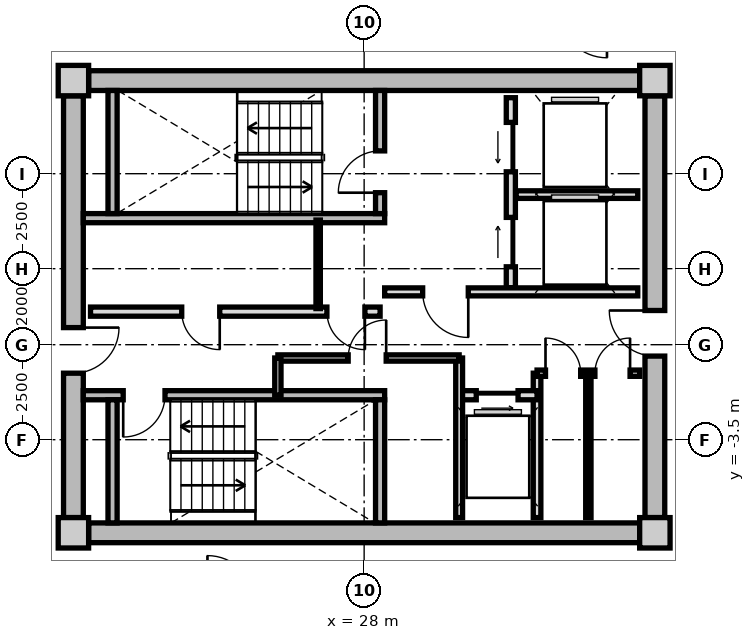
"""IFC4 building model, lengths in metres.
Left out: names, types, materials, properties, quantities, classifications, styles, units other than length and angle.
Written with IfcOpenShell. Run it as: python <this file> out.ifc"""

import sys

from ifc_helpers import new_model, si_unit, direction, frame, frame_2d, origin, origin_2d, place, context, subcontext, project, spatial, rectangle, extrude, source, transform, mapped, element, fill, save


model = new_model("IFC4")
c1 = context("Model", 3, precision=1e-05, world=origin(), true_north=direction((0.0, 1.0)))
c2 = subcontext(c1, "Body", "Model", "MODEL_VIEW")
j1 = project(units=[si_unit("LENGTHUNIT", "METRE"), si_unit("PLANEANGLEUNIT", "RADIAN")], contexts=[c1])
p1 = place(None, origin())
s1 = spatial("IfcSite", under=j1, at=p1, CompositionType="ELEMENT")
p2 = place(p1, origin())
s2 = spatial("IfcBuilding", under=s1, at=p2, CompositionType="ELEMENT")
p3 = place(p2, frame((0.0, 0.0, 241.35)))
s3 = spatial("IfcBuildingStorey", under=s2, at=p3, CompositionType="ELEMENT", Elevation=241.35)
m1 = source(origin(), c2, "Body", "SweptSolid", [
    extrude(rectangle(XDim=0.8, YDim=0.8, at=origin_2d()), origin(), (0.0, 0.0, 1.0), 3.05),
])
for number, where, z_axis, x_axis in (
    (1, (20.35, -5.95, 0.0), (0.0, 0.0, 1.0), (1.0, 0.0, 0.0)),
    (2, (35.65, -5.95, 0.0), (0.0, 0.0, 1.0), (1.0, 0.0, 0.0)),
    (3, (35.65, 5.95, 0.0), (0.0, 0.0, 1.0), (1.0, 0.0, 0.0)),
    (4, (20.35, 5.95, 0.0), (0.0, 0.0, 1.0), (1.0, 0.0, 0.0)),
):
    element("IfcColumn", number, at=place(p3, frame(where, z_axis=z_axis, x_axis=x_axis)), inside=s3, PredefinedType="COLUMN", context=c2, shape_type="MappedRepresentation", body=[
        mapped(m1, transform((0.0, 0.0, 0.0), x_axis=(1.0, 0.0, 0.0), y_axis=(0.0, 1.0, 0.0), z_axis=(0.0, 0.0, 1.0), scale=1.0)),
    ])
m2 = source(origin(), c2, "Body", "SweptSolid", [
    extrude(rectangle(XDim=14.5, YDim=0.52, at=frame_2d((7.25, 0.0))), origin(), (0.0, 0.0, 1.0), 2.73),
])
for number, where, z_axis, x_axis in (
    (5, (20.75, 5.95, 0.0), (0.0, 0.0, 1.0), (1.0, 0.0, 0.0)),
    (6, (35.25, -5.95, 0.0), (0.0, 0.0, 1.0), (-1.0, 0.0, 0.0)),
):
    element("IfcWall", number, at=place(p3, frame(where, z_axis=z_axis, x_axis=x_axis)), inside=s3, PredefinedType="SHEAR", context=c2, shape_type="MappedRepresentation", body=[
        mapped(m2, transform((0.0, 0.0, 0.0), x_axis=(1.0, 0.0, 0.0), y_axis=(0.0, 1.0, 0.0), z_axis=(0.0, 0.0, 1.0), scale=1.0)),
    ])
m3 = source(origin(), c2, "Body", "SweptSolid", [
    extrude(rectangle(XDim=11.1, YDim=0.52, at=frame_2d((5.55, 0.0))), origin(), (0.0, 0.0, 1.0), 2.73),
])
p4 = place(p3, frame((20.35, -5.55, 0.0), z_axis=(0.0, 0.0, 1.0), x_axis=(0.0, 1.0, 0.0)))
e7 = element("IfcWall", 7, at=p4, inside=s3, PredefinedType="SHEAR", context=c2, shape_type="MappedRepresentation", body=[
    mapped(m3, transform((0.0, 0.0, 0.0), x_axis=(1.0, 0.0, 0.0), y_axis=(0.0, 1.0, 0.0), z_axis=(0.0, 0.0, 1.0), scale=1.0)),
])
p5 = place(p4, frame((3.8, 0.0, 0.0)))
e8 = element("IfcOpeningElement", 8, at=p5, cuts=e7, PredefinedType="OPENING", context=c2, shape_type="SweptSolid", body=[
    extrude(rectangle(XDim=1.2, YDim=2.15, at=frame_2d((0.6, 1.075))), frame((0.0, 0.27, 0.0), z_axis=(0.0, -1.0, 0.0), x_axis=(1.0, 0.0, 0.0)), (0.0, 0.0, 1.0), 0.54),
])
p6 = place(p3, frame((35.65, 5.55, 0.0), z_axis=(0.0, 0.0, 1.0), x_axis=(0.0, -1.0, 0.0)))
e9 = element("IfcWall", 9, at=p6, inside=s3, PredefinedType="SHEAR", context=c2, shape_type="MappedRepresentation", body=[
    mapped(m3, transform((0.0, 0.0, 0.0), x_axis=(1.0, 0.0, 0.0), y_axis=(0.0, 1.0, 0.0), z_axis=(0.0, 0.0, 1.0), scale=1.0)),
])
p7 = place(p6, frame((5.65, 0.0, 0.0)))
e10 = element("IfcOpeningElement", 10, at=p7, cuts=e9, PredefinedType="OPENING", context=c2, shape_type="SweptSolid", body=[
    extrude(rectangle(XDim=1.2, YDim=2.15, at=frame_2d((0.6, 1.075))), frame((0.0, 0.27, 0.0), z_axis=(0.0, -1.0, 0.0), x_axis=(1.0, 0.0, 0.0)), (0.0, 0.0, 1.0), 0.54),
])
m4 = source(origin(), c2, "Body", "SweptSolid", [
    extrude(rectangle(XDim=7.93, YDim=0.24, at=frame_2d((3.965, 0.0))), origin(), (0.0, 0.0, 1.0), 2.73),
])
p8 = place(p3, frame((20.61, 2.33, 0.0), z_axis=(0.0, 0.0, 1.0), x_axis=(1.0, 0.0, 0.0)))
e11 = element("IfcWall", 11, at=p8, inside=s3, PredefinedType="PARTITIONING", context=c2, shape_type="MappedRepresentation", body=[
    mapped(m4, transform((0.0, 0.0, 0.0), x_axis=(1.0, 0.0, 0.0), y_axis=(0.0, 1.0, 0.0), z_axis=(0.0, 0.0, 1.0), scale=1.0)),
])
m5 = source(origin(), c2, "Body", "SweptSolid", [
    extrude(rectangle(XDim=3.24, YDim=0.24, at=frame_2d((1.62, 0.0))), origin(), (0.0, 0.0, 1.0), 2.73),
])
p9 = place(p3, frame((21.38, 2.45, 0.0), z_axis=(0.0, 0.0, 1.0), x_axis=(0.0, 1.0, 0.0)))
e12 = element("IfcWall", 12, at=p9, inside=s3, PredefinedType="PARTITIONING", context=c2, shape_type="MappedRepresentation", body=[
    mapped(m5, transform((0.0, 0.0, 0.0), x_axis=(1.0, 0.0, 0.0), y_axis=(0.0, 1.0, 0.0), z_axis=(0.0, 0.0, 1.0), scale=1.0)),
])
p10 = place(p3, frame((28.42, 2.45, 0.0), z_axis=(0.0, 0.0, 1.0), x_axis=(0.0, 1.0, 0.0)))
e13 = element("IfcWall", 13, at=p10, inside=s3, PredefinedType="PARTITIONING", context=c2, shape_type="MappedRepresentation", body=[
    mapped(m5, transform((0.0, 0.0, 0.0), x_axis=(1.0, 0.0, 0.0), y_axis=(0.0, 1.0, 0.0), z_axis=(0.0, 0.0, 1.0), scale=1.0)),
])
p11 = place(p10, frame((0.55, 0.0, 0.0)))
e14 = element("IfcOpeningElement", 14, at=p11, cuts=e13, PredefinedType="OPENING", context=c2, shape_type="SweptSolid", body=[
    extrude(rectangle(XDim=1.1, YDim=2.15, at=frame_2d((0.55, 1.075))), frame((0.0, 0.13, 0.0), z_axis=(0.0, -1.0, 0.0), x_axis=(1.0, 0.0, 0.0)), (0.0, 0.0, 1.0), 0.26),
])
p12 = place(p3, frame((20.61, -2.33, 0.0), z_axis=(0.0, 0.0, 1.0), x_axis=(1.0, 0.0, 0.0)))
e15 = element("IfcWall", 15, at=p12, inside=s3, PredefinedType="PARTITIONING", context=c2, shape_type="MappedRepresentation", body=[
    mapped(m4, transform((0.0, 0.0, 0.0), x_axis=(1.0, 0.0, 0.0), y_axis=(0.0, 1.0, 0.0), z_axis=(0.0, 0.0, 1.0), scale=1.0)),
])
p13 = place(p12, frame((1.05, 0.0, 0.0)))
e16 = element("IfcOpeningElement", 16, at=p13, cuts=e15, PredefinedType="OPENING", context=c2, shape_type="SweptSolid", body=[
    extrude(rectangle(XDim=1.1, YDim=2.15, at=frame_2d((0.55, 1.075))), frame((0.0, 0.13, 0.0), z_axis=(0.0, -1.0, 0.0), x_axis=(1.0, 0.0, 0.0)), (0.0, 0.0, 1.0), 0.26),
])
for number, where, z_axis, x_axis in (
    (17, (21.38, -5.69, 0.0), (0.0, 0.0, 1.0), (0.0, 1.0, 0.0)),
    (18, (28.42, -5.69, 0.0), (0.0, 0.0, 1.0), (0.0, 1.0, 0.0)),
):
    element("IfcWall", number, at=place(p3, frame(where, z_axis=z_axis, x_axis=x_axis)), inside=s3, PredefinedType="PARTITIONING", context=c2, shape_type="MappedRepresentation", body=[
        mapped(m5, transform((0.0, 0.0, 0.0), x_axis=(1.0, 0.0, 0.0), y_axis=(0.0, 1.0, 0.0), z_axis=(0.0, 0.0, 1.0), scale=1.0)),
    ])
m6 = source(origin(), c2, "Body", "SweptSolid", [
    extrude(rectangle(XDim=5.0, YDim=0.24, at=frame_2d((2.5, 0.0))), origin(), (0.0, 0.0, 1.0), 2.715),
])
p14 = place(p3, frame((31.86, 0.5, 0.0), z_axis=(0.0, 0.0, 1.0), x_axis=(0.0, 1.0, 0.0)))
e19 = element("IfcWall", 19, at=p14, inside=s3, PredefinedType="PARTITIONING", context=c2, shape_type="MappedRepresentation", body=[
    mapped(m6, transform((0.0, 0.0, 0.0), x_axis=(1.0, 0.0, 0.0), y_axis=(0.0, 1.0, 0.0), z_axis=(0.0, 0.0, 1.0), scale=1.0)),
])
p15 = place(p14, frame((3.05, 0.0, 0.0)))
e20 = element("IfcOpeningElement", 20, at=p15, cuts=e19, PredefinedType="OPENING", context=c2, shape_type="SweptSolid", body=[
    extrude(rectangle(XDim=1.3, YDim=2.2, at=frame_2d((0.65, 1.1))), frame((0.0, 0.13, 0.0), z_axis=(0.0, -1.0, 0.0), x_axis=(1.0, 0.0, 0.0)), (0.0, 0.0, 1.0), 0.26),
])
p16 = place(p14, frame((0.55, 0.0, 0.0)))
e21 = element("IfcOpeningElement", 21, at=p16, cuts=e19, PredefinedType="OPENING", context=c2, shape_type="SweptSolid", body=[
    extrude(rectangle(XDim=1.3, YDim=2.2, at=frame_2d((0.65, 1.1))), frame((0.0, 0.13, 0.0), z_axis=(0.0, -1.0, 0.0), x_axis=(1.0, 0.0, 0.0)), (0.0, 0.0, 1.0), 0.26),
])
m7 = source(origin(), c2, "Body", "SweptSolid", [
    extrude(rectangle(XDim=3.2, YDim=0.2, at=frame_2d((1.6, 0.0))), origin(), (0.0, 0.0, 1.0), 2.715),
])
p17 = place(p3, frame((32.0, 2.95, 0.0), z_axis=(0.0, 0.0, 1.0), x_axis=(1.0, 0.0, 0.0)))
e22 = element("IfcWall", 22, at=p17, inside=s3, PredefinedType="PARTITIONING", context=c2, shape_type="MappedRepresentation", body=[
    mapped(m7, transform((0.0, 0.0, 0.0), x_axis=(1.0, 0.0, 0.0), y_axis=(0.0, 1.0, 0.0), z_axis=(0.0, 0.0, 1.0), scale=1.0)),
])
m8 = source(origin(), c2, "Body", "SweptSolid", [
    extrude(rectangle(XDim=6.66, YDim=0.21, at=frame_2d((3.33, 0.0))), origin(), (0.0, 0.0, 1.0), 2.715),
])
p18 = place(p3, frame((28.54, 0.39, 0.0), z_axis=(0.0, 0.0, 1.0), x_axis=(1.0, 0.0, 0.0)))
e23 = element("IfcWall", 23, at=p18, inside=s3, PredefinedType="PARTITIONING", context=c2, shape_type="MappedRepresentation", body=[
    mapped(m8, transform((0.0, 0.0, 0.0), x_axis=(1.0, 0.0, 0.0), y_axis=(0.0, 1.0, 0.0), z_axis=(0.0, 0.0, 1.0), scale=1.0)),
])
p19 = place(p18, frame((1.0, 0.0, 0.0)))
e24 = element("IfcOpeningElement", 24, at=p19, cuts=e23, PredefinedType="OPENING", context=c2, shape_type="SweptSolid", body=[
    extrude(rectangle(XDim=1.2, YDim=2.15, at=frame_2d((0.6, 1.075))), frame((0.0, 0.115, 0.0), z_axis=(0.0, -1.0, 0.0), x_axis=(1.0, 0.0, 0.0)), (0.0, 0.0, 1.0), 0.23),
])
m9 = source(origin(), c2, "Body", "SweptSolid", [
    extrude(rectangle(XDim=7.62, YDim=0.24, at=frame_2d((3.81, 0.0))), origin(), (0.0, 0.0, 1.0), 2.715),
])
p20 = place(p3, frame((20.8, -0.13, 0.0), z_axis=(0.0, 0.0, 1.0), x_axis=(1.0, 0.0, 0.0)))
e25 = element("IfcWall", 25, at=p20, inside=s3, PredefinedType="PARTITIONING", context=c2, shape_type="MappedRepresentation", body=[
    mapped(m9, transform((0.0, 0.0, 0.0), x_axis=(1.0, 0.0, 0.0), y_axis=(0.0, 1.0, 0.0), z_axis=(0.0, 0.0, 1.0), scale=1.0)),
])
p21 = place(p20, frame((6.22, 0.0, 0.0)))
e26 = element("IfcOpeningElement", 26, at=p21, cuts=e25, PredefinedType="OPENING", context=c2, shape_type="SweptSolid", body=[
    extrude(rectangle(XDim=1.0, YDim=2.1, at=frame_2d((0.5, 1.05))), frame((0.0, 0.13, 0.0), z_axis=(0.0, -1.0, 0.0), x_axis=(1.0, 0.0, 0.0)), (0.0, 0.0, 1.0), 0.26),
])
p22 = place(p20, frame((2.4, 0.0, 0.0)))
e27 = element("IfcOpeningElement", 27, at=p22, cuts=e25, PredefinedType="OPENING", context=c2, shape_type="SweptSolid", body=[
    extrude(rectangle(XDim=1.0, YDim=2.1, at=frame_2d((0.5, 1.05))), frame((0.0, 0.13, 0.0), z_axis=(0.0, -1.0, 0.0), x_axis=(1.0, 0.0, 0.0)), (0.0, 0.0, 1.0), 0.26),
])
m10 = source(origin(), c2, "Body", "SweptSolid", [
    extrude(rectangle(XDim=2.33, YDim=0.115, at=frame_2d((1.165, 0.0))), origin(), (0.0, 0.0, 1.0), 2.715),
])
p23 = place(p3, frame((26.79, -0.05, 0.0), z_axis=(0.0, 0.0, 1.0), x_axis=(0.0, 1.0, 0.0)))
e28 = element("IfcWall", 28, at=p23, inside=s3, PredefinedType="PARTITIONING", context=c2, shape_type="MappedRepresentation", body=[
    mapped(m10, transform((0.0, 0.0, 0.0), x_axis=(1.0, 0.0, 0.0), y_axis=(0.0, 1.0, 0.0), z_axis=(0.0, 0.0, 1.0), scale=1.0)),
])
m11 = source(origin(), c2, "Body", "SweptSolid", [
    extrude(rectangle(XDim=3.8, YDim=0.2, at=frame_2d((1.9, 0.0))), origin(), (0.0, 0.0, 1.0), 2.715),
])
p24 = place(p3, frame((32.55, -5.55, 0.0), z_axis=(0.0, 0.0, 1.0), x_axis=(0.0, 1.0, 0.0)))
e29 = element("IfcWall", 29, at=p24, inside=s3, PredefinedType="PARTITIONING", context=c2, shape_type="MappedRepresentation", body=[
    mapped(m11, transform((0.0, 0.0, 0.0), x_axis=(1.0, 0.0, 0.0), y_axis=(0.0, 1.0, 0.0), z_axis=(0.0, 0.0, 1.0), scale=1.0)),
])
m12 = source(origin(), c2, "Body", "SweptSolid", [
    extrude(rectangle(XDim=2.05, YDim=0.24, at=frame_2d((1.025, 0.0))), origin(), (0.0, 0.0, 1.0), 2.715),
])
p25 = place(p3, frame((30.5, -2.33, 0.0), z_axis=(0.0, 0.0, 1.0), x_axis=(1.0, 0.0, 0.0)))
e30 = element("IfcWall", 30, at=p25, inside=s3, PredefinedType="PARTITIONING", context=c2, shape_type="MappedRepresentation", body=[
    mapped(m12, transform((0.0, 0.0, 0.0), x_axis=(1.0, 0.0, 0.0), y_axis=(0.0, 1.0, 0.0), z_axis=(0.0, 0.0, 1.0), scale=1.0)),
])
p26 = place(p25, frame((0.45, 0.0, 0.0)))
e31 = element("IfcOpeningElement", 31, at=p26, cuts=e30, PredefinedType="OPENING", context=c2, shape_type="SweptSolid", body=[
    extrude(rectangle(XDim=1.1, YDim=2.2, at=frame_2d((0.55, 1.1))), frame((0.0, 0.13, 0.0), z_axis=(0.0, -1.0, 0.0), x_axis=(1.0, 0.0, 0.0)), (0.0, 0.0, 1.0), 0.26),
])
m13 = source(origin(), c2, "Body", "SweptSolid", [
    extrude(rectangle(XDim=4.2, YDim=0.18, at=frame_2d((2.1, 0.0))), origin(), (0.0, 0.0, 1.0), 2.715),
])
p27 = place(p3, frame((30.5, -5.55, 0.0), z_axis=(0.0, 0.0, 1.0), x_axis=(0.0, 1.0, 0.0)))
e32 = element("IfcWall", 32, at=p27, inside=s3, PredefinedType="PARTITIONING", context=c2, shape_type="MappedRepresentation", body=[
    mapped(m13, transform((0.0, 0.0, 0.0), x_axis=(1.0, 0.0, 0.0), y_axis=(0.0, 1.0, 0.0), z_axis=(0.0, 0.0, 1.0), scale=1.0)),
])
m14 = source(origin(), c2, "Body", "SweptSolid", [
    extrude(rectangle(XDim=4.77, YDim=0.165, at=frame_2d((2.385, 0.0))), origin(), (0.0, 0.0, 1.0), 2.715),
])
p28 = place(p3, frame((25.73, -1.35, 0.0), z_axis=(0.0, 0.0, 1.0), x_axis=(1.0, 0.0, 0.0)))
e33 = element("IfcWall", 33, at=p28, inside=s3, PredefinedType="PARTITIONING", context=c2, shape_type="MappedRepresentation", body=[
    mapped(m14, transform((0.0, 0.0, 0.0), x_axis=(1.0, 0.0, 0.0), y_axis=(0.0, 1.0, 0.0), z_axis=(0.0, 0.0, 1.0), scale=1.0)),
])
p29 = place(p28, frame((1.85, 0.0, 0.0)))
e34 = element("IfcOpeningElement", 34, at=p29, cuts=e33, PredefinedType="OPENING", context=c2, shape_type="SweptSolid", body=[
    extrude(rectangle(XDim=1.0, YDim=2.1, at=frame_2d((0.5, 1.05))), frame((0.0, 0.093, 0.0), z_axis=(0.0, -1.0, 0.0), x_axis=(1.0, 0.0, 0.0)), (0.0, 0.0, 1.0), 0.185),
])
m15 = source(origin(), c2, "Body", "SweptSolid", [
    extrude(rectangle(XDim=0.98, YDim=0.165, at=frame_2d((0.49, 0.0))), origin(), (0.0, 0.0, 1.0), 2.715),
])
p30 = place(p3, frame((25.73, -2.33, 0.0), z_axis=(0.0, 0.0, 1.0), x_axis=(0.0, 1.0, 0.0)))
e35 = element("IfcWall", 35, at=p30, inside=s3, PredefinedType="PARTITIONING", context=c2, shape_type="MappedRepresentation", body=[
    mapped(m15, transform((0.0, 0.0, 0.0), x_axis=(1.0, 0.0, 0.0), y_axis=(0.0, 1.0, 0.0), z_axis=(0.0, 0.0, 1.0), scale=1.0)),
])
m16 = source(origin(), c2, "Body", "SweptSolid", [
    extrude(rectangle(XDim=2.7, YDim=0.165, at=frame_2d((1.35, 0.0))), origin(), (0.0, 0.0, 1.0), 2.715),
])
p31 = place(p3, frame((32.55, -1.75, 0.0), z_axis=(0.0, 0.0, 1.0), x_axis=(1.0, 0.0, 0.0)))
e36 = element("IfcWall", 36, at=p31, inside=s3, PredefinedType="PARTITIONING", context=c2, shape_type="MappedRepresentation", body=[
    mapped(m16, transform((0.0, 0.0, 0.0), x_axis=(1.0, 0.0, 0.0), y_axis=(0.0, 1.0, 0.0), z_axis=(0.0, 0.0, 1.0), scale=1.0)),
])
p32 = place(p31, frame((0.222, 0.0, 0.0)))
e37 = element("IfcOpeningElement", 37, at=p32, cuts=e36, PredefinedType="OPENING", context=c2, shape_type="SweptSolid", body=[
    extrude(rectangle(XDim=0.925, YDim=2.1, at=frame_2d((0.462, 1.05))), frame((0.0, 0.093, 0.0), z_axis=(0.0, -1.0, 0.0), x_axis=(1.0, 0.0, 0.0)), (0.0, 0.0, 1.0), 0.185),
])
p33 = place(p31, frame((1.522, 0.0, 0.0)))
e38 = element("IfcOpeningElement", 38, at=p33, cuts=e36, PredefinedType="OPENING", context=c2, shape_type="SweptSolid", body=[
    extrude(rectangle(XDim=0.925, YDim=2.1, at=frame_2d((0.462, 1.05))), frame((0.0, 0.093, 0.0), z_axis=(0.0, -1.0, 0.0), x_axis=(1.0, 0.0, 0.0)), (0.0, 0.0, 1.0), 0.185),
])
m17 = source(origin(), c2, "Body", "SweptSolid", [
    extrude(rectangle(XDim=3.8, YDim=0.14, at=frame_2d((1.9, 0.0))), origin(), (0.0, 0.0, 1.0), 2.715),
])
p34 = place(p3, frame((33.9, -5.55, 0.0), z_axis=(0.0, 0.0, 1.0), x_axis=(0.0, 1.0, 0.0)))
e39 = element("IfcWall", 39, at=p34, inside=s3, PredefinedType="PARTITIONING", context=c2, shape_type="MappedRepresentation", body=[
    mapped(m17, transform((0.0, 0.0, 0.0), x_axis=(1.0, 0.0, 0.0), y_axis=(0.0, 1.0, 0.0), z_axis=(0.0, 0.0, 1.0), scale=1.0)),
])
m18 = source(origin(), c2, "Body", "SweptSolid", [
    extrude(rectangle(XDim=1.1, YDim=2.15, at=frame_2d((0.55, 1.075))), frame((0.0, 0.025, 0.0), z_axis=(0.0, -1.0, 0.0), x_axis=(1.0, 0.0, 0.0)), (0.0, 0.0, 1.0), 0.05),
])
p35 = place(p11, origin())
e40 = element("IfcDoor", 40, at=p35, inside=s3, OperationType="SINGLE_SWING_LEFT", PredefinedType="DOOR", context=c2, shape_type="MappedRepresentation", body=[
    mapped(m18, transform((0.0, 0.0, 0.0), x_axis=(1.0, 0.0, 0.0), y_axis=(0.0, 1.0, 0.0), z_axis=(0.0, 0.0, 1.0), scale=1.0)),
])
fill(e14, e40)
p36 = place(p13, frame((1.1, 0.0, 0.0), z_axis=(0.0, 0.0, 1.0), x_axis=(-1.0, 0.0, 0.0)))
e41 = element("IfcDoor", 41, at=p36, inside=s3, OperationType="SINGLE_SWING_RIGHT", PredefinedType="DOOR", context=c2, shape_type="MappedRepresentation", body=[
    mapped(m18, transform((0.0, 0.0, 0.0), x_axis=(1.0, 0.0, 0.0), y_axis=(0.0, 1.0, 0.0), z_axis=(0.0, 0.0, 1.0), scale=1.0)),
])
fill(e16, e41)
m19 = source(origin(), c2, "Body", "SweptSolid", [
    extrude(rectangle(XDim=1.3, YDim=2.2, at=frame_2d((0.65, 1.1))), frame((0.0, 0.025, 0.0), z_axis=(0.0, -1.0, 0.0), x_axis=(1.0, 0.0, 0.0)), (0.0, 0.0, 1.0), 0.05),
])
p37 = place(p15, origin())
e42 = element("IfcDoor", 42, at=p37, inside=s3, OperationType="SLIDING_TO_LEFT", PredefinedType="DOOR", context=c2, shape_type="MappedRepresentation", body=[
    mapped(m19, transform((0.0, 0.0, 0.0), x_axis=(1.0, 0.0, 0.0), y_axis=(0.0, 1.0, 0.0), z_axis=(0.0, 0.0, 1.0), scale=1.0)),
])
fill(e20, e42)
p38 = place(p16, origin())
e43 = element("IfcDoor", 43, at=p38, inside=s3, OperationType="SLIDING_TO_RIGHT", PredefinedType="DOOR", context=c2, shape_type="MappedRepresentation", body=[
    mapped(m19, transform((0.0, 0.0, 0.0), x_axis=(1.0, 0.0, 0.0), y_axis=(0.0, 1.0, 0.0), z_axis=(0.0, 0.0, 1.0), scale=1.0)),
])
fill(e21, e43)
m20 = source(origin(), c2, "Body", "SweptSolid", [
    extrude(rectangle(XDim=1.2, YDim=2.15, at=frame_2d((0.6, 1.075))), frame((0.0, 0.025, 0.0), z_axis=(0.0, -1.0, 0.0), x_axis=(1.0, 0.0, 0.0)), (0.0, 0.0, 1.0), 0.05),
])
p39 = place(p19, frame((1.2, 0.0, 0.0), z_axis=(0.0, 0.0, 1.0), x_axis=(-1.0, 0.0, 0.0)))
e44 = element("IfcDoor", 44, at=p39, inside=s3, OperationType="SINGLE_SWING_LEFT", PredefinedType="DOOR", context=c2, shape_type="MappedRepresentation", body=[
    mapped(m20, transform((0.0, 0.0, 0.0), x_axis=(1.0, 0.0, 0.0), y_axis=(0.0, 1.0, 0.0), z_axis=(0.0, 0.0, 1.0), scale=1.0)),
])
fill(e24, e44)
p40 = place(p5, frame((1.2, 0.0, 0.0), z_axis=(0.0, 0.0, 1.0), x_axis=(-1.0, 0.0, 0.0)))
e45 = element("IfcDoor", 45, at=p40, inside=s3, OperationType="SINGLE_SWING_LEFT", PredefinedType="DOOR", context=c2, shape_type="MappedRepresentation", body=[
    mapped(m20, transform((0.0, 0.0, 0.0), x_axis=(1.0, 0.0, 0.0), y_axis=(0.0, 1.0, 0.0), z_axis=(0.0, 0.0, 1.0), scale=1.0)),
])
fill(e8, e45)
p41 = place(p7, frame((1.2, 0.0, 0.0), z_axis=(0.0, 0.0, 1.0), x_axis=(-1.0, 0.0, 0.0)))
e46 = element("IfcDoor", 46, at=p41, inside=s3, OperationType="SINGLE_SWING_RIGHT", PredefinedType="DOOR", context=c2, shape_type="MappedRepresentation", body=[
    mapped(m20, transform((0.0, 0.0, 0.0), x_axis=(1.0, 0.0, 0.0), y_axis=(0.0, 1.0, 0.0), z_axis=(0.0, 0.0, 1.0), scale=1.0)),
])
fill(e10, e46)
m21 = source(origin(), c2, "Body", "SweptSolid", [
    extrude(rectangle(XDim=1.0, YDim=2.1, at=frame_2d((0.5, 1.05))), frame((0.0, 0.025, 0.0), z_axis=(0.0, -1.0, 0.0), x_axis=(1.0, 0.0, 0.0)), (0.0, 0.0, 1.0), 0.05),
])
p42 = place(p21, frame((1.0, 0.0, 0.0), z_axis=(0.0, 0.0, 1.0), x_axis=(-1.0, 0.0, 0.0)))
e47 = element("IfcDoor", 47, at=p42, inside=s3, OperationType="SINGLE_SWING_LEFT", PredefinedType="DOOR", context=c2, shape_type="MappedRepresentation", body=[
    mapped(m21, transform((0.0, 0.0, 0.0), x_axis=(1.0, 0.0, 0.0), y_axis=(0.0, 1.0, 0.0), z_axis=(0.0, 0.0, 1.0), scale=1.0)),
])
fill(e26, e47)
p43 = place(p22, frame((1.0, 0.0, 0.0), z_axis=(0.0, 0.0, 1.0), x_axis=(-1.0, 0.0, 0.0)))
e48 = element("IfcDoor", 48, at=p43, inside=s3, OperationType="SINGLE_SWING_LEFT", PredefinedType="DOOR", context=c2, shape_type="MappedRepresentation", body=[
    mapped(m21, transform((0.0, 0.0, 0.0), x_axis=(1.0, 0.0, 0.0), y_axis=(0.0, 1.0, 0.0), z_axis=(0.0, 0.0, 1.0), scale=1.0)),
])
fill(e27, e48)
m22 = source(origin(), c2, "Body", "SweptSolid", [
    extrude(rectangle(XDim=1.1, YDim=2.2, at=frame_2d((0.55, 1.1))), frame((0.0, 0.025, 0.0), z_axis=(0.0, -1.0, 0.0), x_axis=(1.0, 0.0, 0.0)), (0.0, 0.0, 1.0), 0.05),
])
p44 = place(p26, frame((1.1, 0.0, 0.0), z_axis=(0.0, 0.0, 1.0), x_axis=(-1.0, 0.0, 0.0)))
e49 = element("IfcDoor", 49, at=p44, inside=s3, OperationType="SLIDING_TO_RIGHT", PredefinedType="DOOR", context=c2, shape_type="MappedRepresentation", body=[
    mapped(m22, transform((0.0, 0.0, 0.0), x_axis=(1.0, 0.0, 0.0), y_axis=(0.0, 1.0, 0.0), z_axis=(0.0, 0.0, 1.0), scale=1.0)),
])
fill(e31, e49)
p45 = place(p29, origin())
e50 = element("IfcDoor", 50, at=p45, inside=s3, OperationType="SINGLE_SWING_RIGHT", PredefinedType="DOOR", context=c2, shape_type="MappedRepresentation", body=[
    mapped(m21, transform((0.0, 0.0, 0.0), x_axis=(1.0, 0.0, 0.0), y_axis=(0.0, 1.0, 0.0), z_axis=(0.0, 0.0, 1.0), scale=1.0)),
])
fill(e34, e50)
m23 = source(origin(), c2, "Body", "SweptSolid", [
    extrude(rectangle(XDim=0.925, YDim=2.1, at=frame_2d((0.462, 1.05))), frame((0.0, 0.025, 0.0), z_axis=(0.0, -1.0, 0.0), x_axis=(1.0, 0.0, 0.0)), (0.0, 0.0, 1.0), 0.05),
])
p46 = place(p32, origin())
e51 = element("IfcDoor", 51, at=p46, inside=s3, OperationType="SINGLE_SWING_LEFT", PredefinedType="DOOR", context=c2, shape_type="MappedRepresentation", body=[
    mapped(m23, transform((0.0, 0.0, 0.0), x_axis=(1.0, 0.0, 0.0), y_axis=(0.0, 1.0, 0.0), z_axis=(0.0, 0.0, 1.0), scale=1.0)),
])
fill(e37, e51)
p47 = place(p33, origin())
e52 = element("IfcDoor", 52, at=p47, inside=s3, OperationType="SINGLE_SWING_RIGHT", PredefinedType="DOOR", context=c2, shape_type="MappedRepresentation", body=[
    mapped(m23, transform((0.0, 0.0, 0.0), x_axis=(1.0, 0.0, 0.0), y_axis=(0.0, 1.0, 0.0), z_axis=(0.0, 0.0, 1.0), scale=1.0)),
])
fill(e38, e52)
save(model, sys.argv[1])
